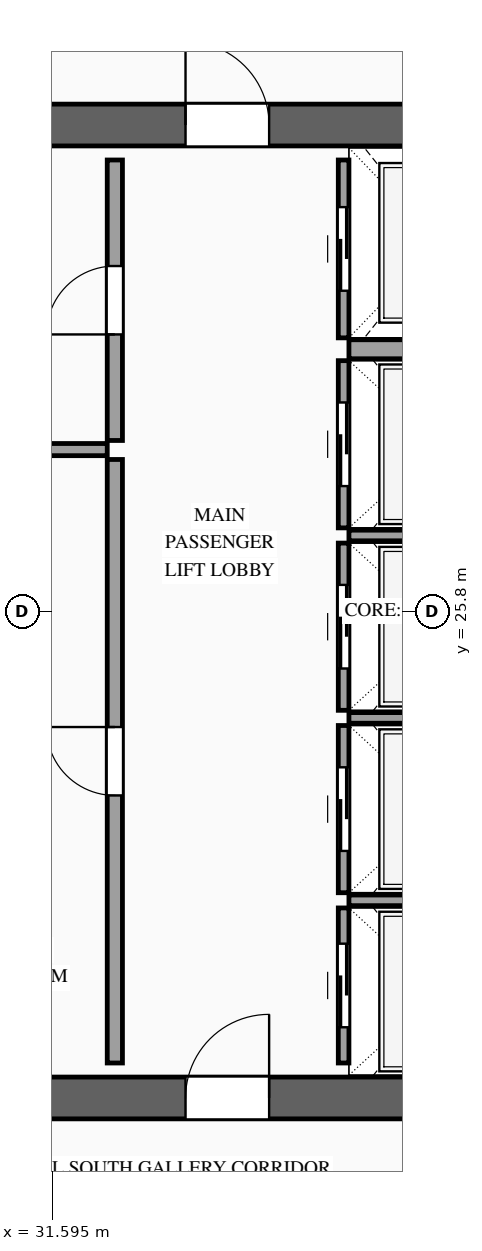
"""IFC4 building model, lengths in metres.
Left out: names, types, materials, properties, quantities, classifications, styles, units other than length and angle.
Written with IfcOpenShell. Run it as: python <this file> out.ifc"""

import sys

from ifc_helpers import new_model, si_unit, direction, frame, frame_2d, origin, place, context, subcontext, project, spatial, rectangle, extrude, source, transform, mapped, element, fill, save


model = new_model("IFC4")
c1 = context("Model", 3, precision=1e-05, world=origin(), true_north=direction((0.0, 1.0)))
c2 = subcontext(c1, "Body", "Model", "MODEL_VIEW")
j1 = project(units=[si_unit("LENGTHUNIT", "METRE"), si_unit("PLANEANGLEUNIT", "RADIAN")], contexts=[c1])
p1 = place(None, origin())
s1 = spatial("IfcSite", under=j1, at=p1, CompositionType="ELEMENT")
p2 = place(p1, origin())
s2 = spatial("IfcBuilding", under=s1, at=p2, CompositionType="ELEMENT")
p3 = place(p2, frame((0.0, 0.0, 238.1)))
s3 = spatial("IfcBuildingStorey", under=s2, at=p3, CompositionType="ELEMENT", Elevation=238.1)
p4 = place(p3, frame((23.525, 19.4, 0.0), z_axis=(0.0, 0.0, 1.0), x_axis=(1.0, 0.0, 0.0)))
e1 = element("IfcWall", 1, at=p4, inside=s3, PredefinedType="SHEAR", context=c2, shape_type="SweptSolid", body=[
    extrude(rectangle(XDim=26.95, YDim=0.55, at=frame_2d((13.475, 0.0))), origin(), (0.0, 0.0, 1.0), 3.5),
])
p5 = place(p4, frame((1.925, 0.0, 0.0)))
e2 = element("IfcOpeningElement", 2, at=p5, cuts=e1, PredefinedType="OPENING", context=c2, shape_type="SweptSolid", body=[
    extrude(rectangle(XDim=1.1, YDim=2.2, at=frame_2d((0.55, 1.1))), frame((0.0, 0.29, 0.0), z_axis=(0.0, -1.0, 0.0), x_axis=(1.0, 0.0, 0.0)), (0.0, 0.0, 1.0), 0.58),
])
p6 = place(p4, frame((9.825, 0.0, 0.0)))
e3 = element("IfcOpeningElement", 3, at=p6, cuts=e1, PredefinedType="OPENING", context=c2, shape_type="SweptSolid", body=[
    extrude(rectangle(XDim=1.1, YDim=2.2, at=frame_2d((0.55, 1.1))), frame((0.0, 0.29, 0.0), z_axis=(0.0, -1.0, 0.0), x_axis=(1.0, 0.0, 0.0)), (0.0, 0.0, 1.0), 0.58),
])
p7 = place(p4, frame((23.025, 0.0, 0.0)))
e4 = element("IfcOpeningElement", 4, at=p7, cuts=e1, PredefinedType="OPENING", context=c2, shape_type="SweptSolid", body=[
    extrude(rectangle(XDim=1.1, YDim=2.2, at=frame_2d((0.55, 1.1))), frame((0.0, 0.29, 0.0), z_axis=(0.0, -1.0, 0.0), x_axis=(1.0, 0.0, 0.0)), (0.0, 0.0, 1.0), 0.58),
])
p8 = place(p4, frame((19.645, 0.0, 0.0)))
e5 = element("IfcOpeningElement", 5, at=p8, cuts=e1, PredefinedType="OPENING", context=c2, shape_type="SweptSolid", body=[
    extrude(rectangle(XDim=0.9, YDim=2.15, at=frame_2d((0.45, 1.075))), frame((0.0, 0.29, 0.0), z_axis=(0.0, -1.0, 0.0), x_axis=(1.0, 0.0, 0.0)), (0.0, 0.0, 1.0), 0.58),
])
p9 = place(p4, frame((18.205, 0.0, 0.0)))
e6 = element("IfcOpeningElement", 6, at=p9, cuts=e1, PredefinedType="OPENING", context=c2, shape_type="SweptSolid", body=[
    extrude(rectangle(XDim=0.9, YDim=2.15, at=frame_2d((0.45, 1.075))), frame((0.0, 0.29, 0.0), z_axis=(0.0, -1.0, 0.0), x_axis=(1.0, 0.0, 0.0)), (0.0, 0.0, 1.0), 0.58),
])
p10 = place(p3, frame((23.525, 32.2, 0.0), z_axis=(0.0, 0.0, 1.0), x_axis=(1.0, 0.0, 0.0)))
e7 = element("IfcWall", 7, at=p10, inside=s3, PredefinedType="SHEAR", context=c2, shape_type="SweptSolid", body=[
    extrude(rectangle(XDim=26.95, YDim=0.55, at=frame_2d((13.475, 0.0))), origin(), (0.0, 0.0, 1.0), 3.5),
])
p11 = place(p10, frame((4.545, 0.0, 0.0)))
e8 = element("IfcOpeningElement", 8, at=p11, cuts=e7, PredefinedType="OPENING", context=c2, shape_type="SweptSolid", body=[
    extrude(rectangle(XDim=0.9, YDim=2.15, at=frame_2d((0.45, 1.075))), frame((0.0, 0.29, 0.0), z_axis=(0.0, -1.0, 0.0), x_axis=(1.0, 0.0, 0.0)), (0.0, 0.0, 1.0), 0.58),
])
p12 = place(p10, frame((9.825, 0.0, 0.0)))
e9 = element("IfcOpeningElement", 9, at=p12, cuts=e7, PredefinedType="OPENING", context=c2, shape_type="SweptSolid", body=[
    extrude(rectangle(XDim=1.1, YDim=2.2, at=frame_2d((0.55, 1.1))), frame((0.0, 0.29, 0.0), z_axis=(0.0, -1.0, 0.0), x_axis=(1.0, 0.0, 0.0)), (0.0, 0.0, 1.0), 0.58),
])
p13 = place(p10, frame((15.675, 0.0, 0.0)))
e10 = element("IfcOpeningElement", 10, at=p13, cuts=e7, PredefinedType="OPENING", context=c2, shape_type="SweptSolid", body=[
    extrude(rectangle(XDim=1.1, YDim=2.2, at=frame_2d((0.55, 1.1))), frame((0.0, 0.29, 0.0), z_axis=(0.0, -1.0, 0.0), x_axis=(1.0, 0.0, 0.0)), (0.0, 0.0, 1.0), 0.58),
])
p14 = place(p10, frame((18.205, 0.0, 0.0)))
e11 = element("IfcOpeningElement", 11, at=p14, cuts=e7, PredefinedType="OPENING", context=c2, shape_type="SweptSolid", body=[
    extrude(rectangle(XDim=0.9, YDim=2.15, at=frame_2d((0.45, 1.075))), frame((0.0, 0.29, 0.0), z_axis=(0.0, -1.0, 0.0), x_axis=(1.0, 0.0, 0.0)), (0.0, 0.0, 1.0), 0.58),
])
p15 = place(p10, frame((19.645, 0.0, 0.0)))
e12 = element("IfcOpeningElement", 12, at=p15, cuts=e7, PredefinedType="OPENING", context=c2, shape_type="SweptSolid", body=[
    extrude(rectangle(XDim=0.9, YDim=2.15, at=frame_2d((0.45, 1.075))), frame((0.0, 0.29, 0.0), z_axis=(0.0, -1.0, 0.0), x_axis=(1.0, 0.0, 0.0)), (0.0, 0.0, 1.0), 0.58),
])
p16 = place(p3, frame((35.43, 19.86, 0.0), z_axis=(0.0, 0.0, 1.0), x_axis=(0.0, 1.0, 0.0)))
e13 = element("IfcWall", 13, at=p16, inside=s3, PredefinedType="SOLIDWALL", context=c2, shape_type="SweptSolid", body=[
    extrude(rectangle(XDim=2.04, YDim=0.14, at=frame_2d((1.02, 0.0))), origin(), (0.0, 0.0, 1.0), 3.28),
])
p17 = place(p16, frame((0.47, 0.0, 0.0)))
e14 = element("IfcOpeningElement", 14, at=p17, cuts=e13, PredefinedType="OPENING", context=c2, shape_type="SweptSolid", body=[
    extrude(rectangle(XDim=1.1, YDim=2.2, at=frame_2d((0.55, 1.1))), frame((0.0, 0.085, 0.0), z_axis=(0.0, -1.0, 0.0), x_axis=(1.0, 0.0, 0.0)), (0.0, 0.0, 1.0), 0.17),
])
m1 = source(origin(), c2, "Body", "SweptSolid", [
    extrude(rectangle(XDim=2.4, YDim=0.14, at=frame_2d((1.2, 0.0))), origin(), (0.0, 0.0, 1.0), 3.28),
])
p18 = place(p3, frame((35.5, 22.0, 0.0), z_axis=(0.0, 0.0, 1.0), x_axis=(1.0, 0.0, 0.0)))
e15 = element("IfcWall", 15, at=p18, inside=s3, PredefinedType="SOLIDWALL", context=c2, shape_type="MappedRepresentation", body=[
    mapped(m1, transform((0.0, 0.0, 0.0), scale=1.0)),
])
p19 = place(p3, frame((35.43, 22.1, 0.0), z_axis=(0.0, 0.0, 1.0), x_axis=(0.0, 1.0, 0.0)))
e16 = element("IfcWall", 16, at=p19, inside=s3, PredefinedType="SOLIDWALL", context=c2, shape_type="SweptSolid", body=[
    extrude(rectangle(XDim=2.2, YDim=0.14, at=frame_2d((1.1, 0.0))), origin(), (0.0, 0.0, 1.0), 3.28),
])
p20 = place(p19, frame((0.55, 0.0, 0.0)))
e17 = element("IfcOpeningElement", 17, at=p20, cuts=e16, PredefinedType="OPENING", context=c2, shape_type="SweptSolid", body=[
    extrude(rectangle(XDim=1.1, YDim=2.2, at=frame_2d((0.55, 1.1))), frame((0.0, 0.085, 0.0), z_axis=(0.0, -1.0, 0.0), x_axis=(1.0, 0.0, 0.0)), (0.0, 0.0, 1.0), 0.17),
])
p21 = place(p3, frame((35.5, 24.4, 0.0), z_axis=(0.0, 0.0, 1.0), x_axis=(1.0, 0.0, 0.0)))
e18 = element("IfcWall", 18, at=p21, inside=s3, PredefinedType="SOLIDWALL", context=c2, shape_type="MappedRepresentation", body=[
    mapped(m1, transform((0.0, 0.0, 0.0), scale=1.0)),
])
p22 = place(p3, frame((35.43, 24.5, 0.0), z_axis=(0.0, 0.0, 1.0), x_axis=(0.0, 1.0, 0.0)))
e19 = element("IfcWall", 19, at=p22, inside=s3, PredefinedType="SOLIDWALL", context=c2, shape_type="SweptSolid", body=[
    extrude(rectangle(XDim=2.2, YDim=0.14, at=frame_2d((1.1, 0.0))), origin(), (0.0, 0.0, 1.0), 3.28),
])
p23 = place(p22, frame((0.55, 0.0, 0.0)))
e20 = element("IfcOpeningElement", 20, at=p23, cuts=e19, PredefinedType="OPENING", context=c2, shape_type="SweptSolid", body=[
    extrude(rectangle(XDim=1.1, YDim=2.2, at=frame_2d((0.55, 1.1))), frame((0.0, 0.085, 0.0), z_axis=(0.0, -1.0, 0.0), x_axis=(1.0, 0.0, 0.0)), (0.0, 0.0, 1.0), 0.17),
])
p24 = place(p3, frame((35.5, 26.8, 0.0), z_axis=(0.0, 0.0, 1.0), x_axis=(1.0, 0.0, 0.0)))
e21 = element("IfcWall", 21, at=p24, inside=s3, PredefinedType="SOLIDWALL", context=c2, shape_type="MappedRepresentation", body=[
    mapped(m1, transform((0.0, 0.0, 0.0), scale=1.0)),
])
p25 = place(p3, frame((35.43, 26.9, 0.0), z_axis=(0.0, 0.0, 1.0), x_axis=(0.0, 1.0, 0.0)))
e22 = element("IfcWall", 22, at=p25, inside=s3, PredefinedType="SOLIDWALL", context=c2, shape_type="SweptSolid", body=[
    extrude(rectangle(XDim=2.2, YDim=0.14, at=frame_2d((1.1, 0.0))), origin(), (0.0, 0.0, 1.0), 3.28),
])
p26 = place(p25, frame((0.55, 0.0, 0.0)))
e23 = element("IfcOpeningElement", 23, at=p26, cuts=e22, PredefinedType="OPENING", context=c2, shape_type="SweptSolid", body=[
    extrude(rectangle(XDim=1.1, YDim=2.2, at=frame_2d((0.55, 1.1))), frame((0.0, 0.085, 0.0), z_axis=(0.0, -1.0, 0.0), x_axis=(1.0, 0.0, 0.0)), (0.0, 0.0, 1.0), 0.17),
])
p27 = place(p3, frame((35.43, 29.4, 0.0), z_axis=(0.0, 0.0, 1.0), x_axis=(0.0, 1.0, 0.0)))
e24 = element("IfcWall", 24, at=p27, inside=s3, PredefinedType="SOLIDWALL", context=c2, shape_type="SweptSolid", body=[
    extrude(rectangle(XDim=2.34, YDim=0.14, at=frame_2d((1.17, 0.0))), origin(), (0.0, 0.0, 1.0), 3.28),
])
p28 = place(p27, frame((0.62, 0.0, 0.0)))
e25 = element("IfcOpeningElement", 25, at=p28, cuts=e24, PredefinedType="OPENING", context=c2, shape_type="SweptSolid", body=[
    extrude(rectangle(XDim=1.1, YDim=2.2, at=frame_2d((0.55, 1.1))), frame((0.0, 0.085, 0.0), z_axis=(0.0, -1.0, 0.0), x_axis=(1.0, 0.0, 0.0)), (0.0, 0.0, 1.0), 0.17),
])
m2 = source(origin(), c2, "Body", "SweptSolid", [
    extrude(rectangle(XDim=2.4, YDim=0.25, at=frame_2d((1.2, 0.0))), origin(), (0.0, 0.0, 1.0), 3.28),
])
p29 = place(p3, frame((35.5, 29.25, 0.0), z_axis=(0.0, 0.0, 1.0), x_axis=(1.0, 0.0, 0.0)))
e26 = element("IfcWall", 26, at=p29, inside=s3, PredefinedType="SOLIDWALL", context=c2, shape_type="MappedRepresentation", body=[
    mapped(m2, transform((0.0, 0.0, 0.0), scale=1.0)),
])
p30 = place(p3, frame((32.42, 19.86, 0.0), z_axis=(0.0, 0.0, 1.0), x_axis=(0.0, 1.0, 0.0)))
e27 = element("IfcWall", 27, at=p30, inside=s3, PredefinedType="PARTITIONING", context=c2, shape_type="SweptSolid", body=[
    extrude(rectangle(XDim=7.94, YDim=0.2, at=frame_2d((3.97, 0.0))), origin(), (0.0, 0.0, 1.0), 3.28),
])
p31 = place(p30, frame((3.52, 0.0, 0.0)))
e28 = element("IfcOpeningElement", 28, at=p31, cuts=e27, PredefinedType="OPENING", context=c2, shape_type="SweptSolid", body=[
    extrude(rectangle(XDim=0.9, YDim=2.15, at=frame_2d((0.45, 1.075))), frame((0.0, 0.115, 0.0), z_axis=(0.0, -1.0, 0.0), x_axis=(1.0, 0.0, 0.0)), (0.0, 0.0, 1.0), 0.23),
])
p32 = place(p3, frame((32.42, 28.05, 0.0), z_axis=(0.0, 0.0, 1.0), x_axis=(0.0, 1.0, 0.0)))
e29 = element("IfcWall", 29, at=p32, inside=s3, PredefinedType="PARTITIONING", context=c2, shape_type="SweptSolid", body=[
    extrude(rectangle(XDim=3.69, YDim=0.2, at=frame_2d((1.845, 0.0))), origin(), (0.0, 0.0, 1.0), 3.28),
])
p33 = place(p32, frame((1.395, 0.0, 0.0)))
e30 = element("IfcOpeningElement", 30, at=p33, cuts=e29, PredefinedType="OPENING", context=c2, shape_type="SweptSolid", body=[
    extrude(rectangle(XDim=0.9, YDim=2.15, at=frame_2d((0.45, 1.075))), frame((0.0, 0.115, 0.0), z_axis=(0.0, -1.0, 0.0), x_axis=(1.0, 0.0, 0.0)), (0.0, 0.0, 1.0), 0.23),
])
m3 = source(origin(), c2, "Body", "SweptSolid", [
    extrude(rectangle(XDim=2.47, YDim=0.16, at=frame_2d((1.235, 0.0))), origin(), (0.0, 0.0, 1.0), 3.28),
])
p34 = place(p3, frame((29.85, 27.93, 0.0), z_axis=(0.0, 0.0, 1.0), x_axis=(1.0, 0.0, 0.0)))
e31 = element("IfcWall", 31, at=p34, inside=s3, PredefinedType="PARTITIONING", context=c2, shape_type="MappedRepresentation", body=[
    mapped(m3, transform((0.0, 0.0, 0.0), scale=1.0)),
])
m4 = source(origin(), c2, "Body", "SweptSolid", [
    extrude(rectangle(XDim=1.1, YDim=2.2, at=frame_2d((0.55, 1.1))), frame((0.0, 0.025, 0.0), z_axis=(0.0, -1.0, 0.0), x_axis=(1.0, 0.0, 0.0)), (0.0, 0.0, 1.0), 0.05),
])
p35 = place(p17, origin())
e32 = element("IfcDoor", 32, at=p35, inside=s3, OperationType="SLIDING_TO_RIGHT", PredefinedType="DOOR", context=c2, shape_type="MappedRepresentation", body=[
    mapped(m4, transform((0.0, 0.0, 0.0), scale=1.0)),
])
fill(e14, e32)
p36 = place(p20, origin())
e33 = element("IfcDoor", 33, at=p36, inside=s3, OperationType="SLIDING_TO_LEFT", PredefinedType="DOOR", context=c2, shape_type="MappedRepresentation", body=[
    mapped(m4, transform((0.0, 0.0, 0.0), scale=1.0)),
])
fill(e17, e33)
p37 = place(p23, origin())
e34 = element("IfcDoor", 34, at=p37, inside=s3, OperationType="SLIDING_TO_RIGHT", PredefinedType="DOOR", context=c2, shape_type="MappedRepresentation", body=[
    mapped(m4, transform((0.0, 0.0, 0.0), scale=1.0)),
])
fill(e20, e34)
p38 = place(p26, origin())
e35 = element("IfcDoor", 35, at=p38, inside=s3, OperationType="SLIDING_TO_LEFT", PredefinedType="DOOR", context=c2, shape_type="MappedRepresentation", body=[
    mapped(m4, transform((0.0, 0.0, 0.0), scale=1.0)),
])
fill(e23, e35)
p39 = place(p28, origin())
e36 = element("IfcDoor", 36, at=p39, inside=s3, OperationType="SLIDING_TO_RIGHT", PredefinedType="DOOR", context=c2, shape_type="MappedRepresentation", body=[
    mapped(m4, transform((0.0, 0.0, 0.0), scale=1.0)),
])
fill(e25, e36)
m5 = source(origin(), c2, "Body", "SweptSolid", [
    extrude(rectangle(XDim=1.1, YDim=2.2, at=frame_2d((0.55, 1.1))), frame((0.0, 0.025, 0.0), z_axis=(0.0, -1.0, 0.0), x_axis=(1.0, 0.0, 0.0)), (0.0, 0.0, 1.0), 0.05),
])
p40 = place(p6, origin())
e37 = element("IfcDoor", 37, at=p40, inside=s3, OperationType="SINGLE_SWING_RIGHT", PredefinedType="DOOR", context=c2, shape_type="MappedRepresentation", body=[
    mapped(m5, transform((0.0, 0.0, 0.0), scale=1.0)),
])
fill(e3, e37)
p41 = place(p12, origin())
e38 = element("IfcDoor", 38, at=p41, inside=s3, OperationType="SINGLE_SWING_LEFT", PredefinedType="DOOR", context=c2, shape_type="MappedRepresentation", body=[
    mapped(m5, transform((0.0, 0.0, 0.0), scale=1.0)),
])
fill(e9, e38)
m6 = source(origin(), c2, "Body", "SweptSolid", [
    extrude(rectangle(XDim=0.9, YDim=2.15, at=frame_2d((0.45, 1.075))), frame((0.0, 0.025, 0.0), z_axis=(0.0, -1.0, 0.0), x_axis=(1.0, 0.0, 0.0)), (0.0, 0.0, 1.0), 0.05),
])
p42 = place(p31, origin())
e39 = element("IfcDoor", 39, at=p42, inside=s3, OperationType="SINGLE_SWING_RIGHT", PredefinedType="DOOR", context=c2, shape_type="MappedRepresentation", body=[
    mapped(m6, transform((0.0, 0.0, 0.0), scale=1.0)),
])
fill(e28, e39)
p43 = place(p33, origin())
e40 = element("IfcDoor", 40, at=p43, inside=s3, OperationType="SINGLE_SWING_LEFT", PredefinedType="DOOR", context=c2, shape_type="MappedRepresentation", body=[
    mapped(m6, transform((0.0, 0.0, 0.0), scale=1.0)),
])
fill(e30, e40)
save(model, sys.argv[1])
